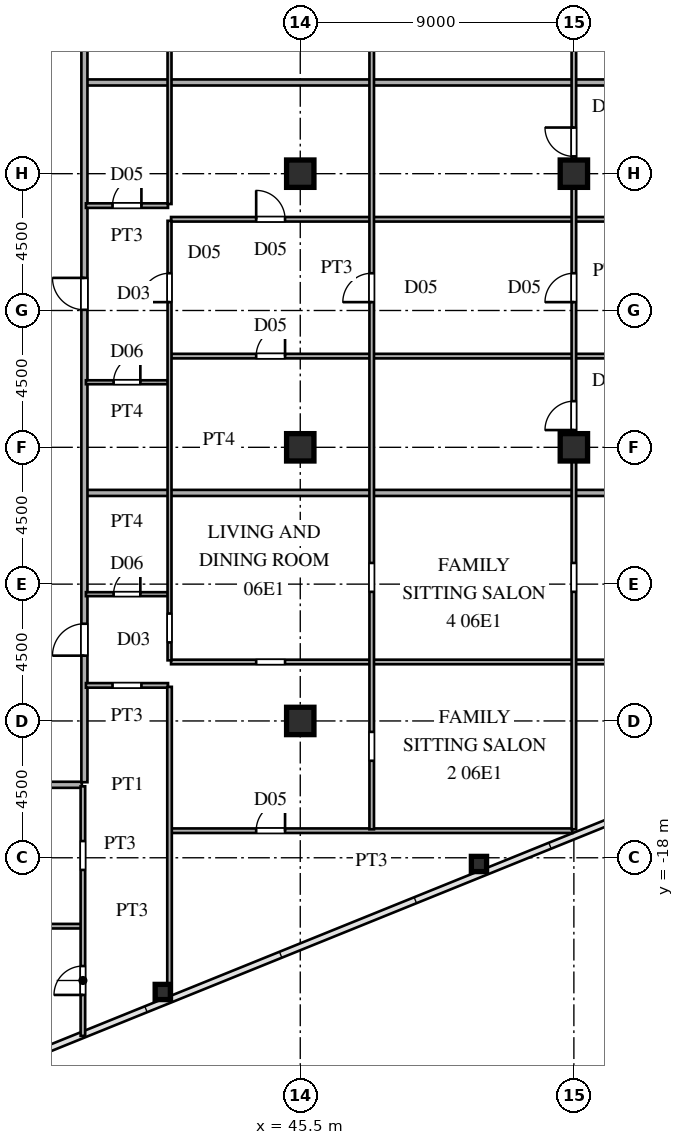
"""IFC4 building model, lengths in metres.
Left out: names, types, materials, properties, quantities, classifications, styles, units other than length and angle.
Written with IfcOpenShell. Run it as: python <this file> out.ifc"""

import sys

from ifc_helpers import new_model, si_unit, direction, frame, frame_2d, origin, origin_2d, place, context, subcontext, project, spatial, rectangle, hollow_rectangle, i_section, extrude, source, transform, mapped, element, fill, save


model = new_model("IFC4")
c1 = context("Model", 3, precision=1e-05, world=origin(), true_north=direction((0.0, 1.0)))
c2 = subcontext(c1, "Body", "Model", "MODEL_VIEW")
j1 = project(units=[si_unit("LENGTHUNIT", "METRE"), si_unit("PLANEANGLEUNIT", "RADIAN")], contexts=[c1])
p1 = place(None, origin())
s1 = spatial("IfcSite", under=j1, at=p1, CompositionType="ELEMENT")
p2 = place(p1, origin())
s2 = spatial("IfcBuilding", under=s1, at=p2, CompositionType="ELEMENT")
p3 = place(p2, frame((0.0, 0.0, 26.1)))
s3 = spatial("IfcBuildingStorey", under=s2, at=p3, CompositionType="ELEMENT", Elevation=26.1)
m1 = source(origin(), c2, "Body", "SweptSolid", [
    extrude(i_section(OverallWidth=0.9, OverallDepth=0.9, WebThickness=0.036, FlangeThickness=0.055, at=origin_2d()), origin(), (0.0, 0.0, 1.0), 3.6),
])
for number, where, z_axis, x_axis in (
    (1, (45.5, -13.5, 0.0), (0.0, 0.0, 1.0), (1.0, 0.0, 0.0)),
    (2, (45.5, -4.5, 0.0), (0.0, 0.0, 1.0), (1.0, 0.0, 0.0)),
    (3, (45.5, 4.5, 0.0), (0.0, 0.0, 1.0), (1.0, 0.0, 0.0)),
    (4, (54.5, -4.5, 0.0), (0.0, 0.0, 1.0), (1.0, 0.0, 0.0)),
    (5, (54.5, 4.5, 0.0), (0.0, 0.0, 1.0), (1.0, 0.0, 0.0)),
):
    element("IfcColumn", number, at=place(p3, frame(where, z_axis=z_axis, x_axis=x_axis)), inside=s3, PredefinedType="COLUMN", context=c2, shape_type="MappedRepresentation", body=[
        mapped(m1, transform((0.0, 0.0, 0.0), scale=1.0)),
    ])
m2 = source(origin(), c2, "Body", "SweptSolid", [
    extrude(hollow_rectangle(XDim=0.5, YDim=0.5, WallThickness=0.02, at=origin_2d()), origin(), (0.0, 0.0, 1.0), 3.6),
])
for number, where, z_axis, x_axis in (
    (6, (40.977, -22.414, 0.0), (0.0, 0.0, 1.0), (1.0, 0.0, 0.0)),
    (7, (51.378, -18.204, 0.0), (0.0, 0.0, 1.0), (1.0, 0.0, 0.0)),
):
    element("IfcColumn", number, at=place(p3, frame(where, z_axis=z_axis, x_axis=x_axis)), inside=s3, PredefinedType="COLUMN", context=c2, shape_type="MappedRepresentation", body=[
        mapped(m2, transform((0.0, 0.0, 0.0), scale=1.0)),
    ])
p4 = place(p3, frame((27.465, -20.25, 0.0), z_axis=(0.0, 0.0, 1.0), x_axis=(1.0, 0.0, 0.0)))
e8 = element("IfcWall", 8, at=p4, inside=s3, PredefinedType="PARTITIONING", context=c2, shape_type="SweptSolid", body=[
    extrude(rectangle(XDim=10.835, YDim=0.15, at=frame_2d((5.417, 0.0))), origin(), (0.0, 0.0, 1.0), 3.38),
])
p5 = place(p3, frame((41.25, -17.11, 0.0), z_axis=(0.0, 0.0, 1.0), x_axis=(1.0, 0.0, 0.0)))
e9 = element("IfcWall", 9, at=p5, inside=s3, PredefinedType="PARTITIONING", context=c2, shape_type="SweptSolid", body=[
    extrude(rectangle(XDim=13.2, YDim=0.15, at=frame_2d((6.6, 0.0))), origin(), (0.0, 0.0, 1.0), 3.38),
])
p6 = place(p5, frame((2.8, 0.0, 0.0)))
e10 = element("IfcOpeningElement", 10, at=p6, cuts=e9, PredefinedType="OPENING", context=c2, shape_type="SweptSolid", body=[
    extrude(rectangle(XDim=0.95, YDim=2.15, at=frame_2d((0.475, 1.075))), frame((0.0, 0.085, 0.0), z_axis=(0.0, -1.0, 0.0), x_axis=(1.0, 0.0, 0.0)), (0.0, 0.0, 1.0), 0.17),
])
p7 = place(p3, frame((36.585, -15.6, 0.0), z_axis=(0.0, 0.0, 1.0), x_axis=(1.0, 0.0, 0.0)))
e11 = element("IfcWall", 11, at=p7, inside=s3, PredefinedType="PARTITIONING", context=c2, shape_type="SweptSolid", body=[
    extrude(rectangle(XDim=1.73, YDim=0.2, at=frame_2d((0.865, 0.0))), origin(), (0.0, 0.0, 1.0), 3.38),
])
p8 = place(p3, frame((38.45, -12.33, 0.0), z_axis=(0.0, 0.0, 1.0), x_axis=(1.0, 0.0, 0.0)))
e12 = element("IfcWall", 12, at=p8, inside=s3, PredefinedType="PARTITIONING", context=c2, shape_type="SweptSolid", body=[
    extrude(rectangle(XDim=2.7, YDim=0.15, at=frame_2d((1.35, 0.0))), origin(), (0.0, 0.0, 1.0), 3.38),
])
p9 = place(p8, frame((0.875, 0.0, 0.0)))
e13 = element("IfcOpeningElement", 13, at=p9, cuts=e12, PredefinedType="OPENING", context=c2, shape_type="SweptSolid", body=[
    extrude(rectangle(XDim=0.95, YDim=2.15, at=frame_2d((0.475, 1.075))), frame((0.0, 0.085, 0.0), z_axis=(0.0, -1.0, 0.0), x_axis=(1.0, 0.0, 0.0)), (0.0, 0.0, 1.0), 0.17),
])
p10 = place(p3, frame((41.25, -11.56, 0.0), z_axis=(0.0, 0.0, 1.0), x_axis=(1.0, 0.0, 0.0)))
e14 = element("IfcWall", 14, at=p10, inside=s3, PredefinedType="PARTITIONING", context=c2, shape_type="SweptSolid", body=[
    extrude(rectangle(XDim=27.44, YDim=0.15, at=frame_2d((13.72, 0.0))), origin(), (0.0, 0.0, 1.0), 3.38),
])
p11 = place(p10, frame((2.8, 0.0, 0.0)))
e15 = element("IfcOpeningElement", 15, at=p11, cuts=e14, PredefinedType="OPENING", context=c2, shape_type="SweptSolid", body=[
    extrude(rectangle(XDim=0.95, YDim=2.15, at=frame_2d((0.475, 1.075))), frame((0.0, 0.085, 0.0), z_axis=(0.0, -1.0, 0.0), x_axis=(1.0, 0.0, 0.0)), (0.0, 0.0, 1.0), 0.17),
])
p12 = place(p10, frame((15.625, 0.0, 0.0)))
e16 = element("IfcOpeningElement", 16, at=p12, cuts=e14, PredefinedType="OPENING", context=c2, shape_type="SweptSolid", body=[
    extrude(rectangle(XDim=0.95, YDim=2.15, at=frame_2d((0.475, 1.075))), frame((0.0, 0.085, 0.0), z_axis=(0.0, -1.0, 0.0), x_axis=(1.0, 0.0, 0.0)), (0.0, 0.0, 1.0), 0.17),
])
p13 = place(p3, frame((38.45, -9.33, 0.0), z_axis=(0.0, 0.0, 1.0), x_axis=(1.0, 0.0, 0.0)))
e17 = element("IfcWall", 17, at=p13, inside=s3, PredefinedType="PARTITIONING", context=c2, shape_type="SweptSolid", body=[
    extrude(rectangle(XDim=2.7, YDim=0.13, at=frame_2d((1.35, 0.0))), origin(), (0.0, 0.0, 1.0), 3.38),
])
p14 = place(p13, frame((0.91, 0.0, 0.0)))
e18 = element("IfcOpeningElement", 18, at=p14, cuts=e17, PredefinedType="OPENING", context=c2, shape_type="SweptSolid", body=[
    extrude(rectangle(XDim=0.88, YDim=2.1, at=frame_2d((0.44, 1.05))), frame((0.0, 0.075, 0.0), z_axis=(0.0, -1.0, 0.0), x_axis=(1.0, 0.0, 0.0)), (0.0, 0.0, 1.0), 0.15),
])
p15 = place(p3, frame((38.48, -6.0, 0.0), z_axis=(0.0, 0.0, 1.0), x_axis=(1.0, 0.0, 0.0)))
e19 = element("IfcWall", 19, at=p15, inside=s3, PredefinedType="PARTITIONING", context=c2, shape_type="SweptSolid", body=[
    extrude(rectangle(XDim=34.025, YDim=0.2, at=frame_2d((17.012, 0.0))), origin(), (0.0, 0.0, 1.0), 3.38),
])
p16 = place(p3, frame((38.45, -2.36, 0.0), z_axis=(0.0, 0.0, 1.0), x_axis=(1.0, 0.0, 0.0)))
e20 = element("IfcWall", 20, at=p16, inside=s3, PredefinedType="PARTITIONING", context=c2, shape_type="SweptSolid", body=[
    extrude(rectangle(XDim=2.7, YDim=0.13, at=frame_2d((1.35, 0.0))), origin(), (0.0, 0.0, 1.0), 3.38),
])
p17 = place(p16, frame((0.91, 0.0, 0.0)))
e21 = element("IfcOpeningElement", 21, at=p17, cuts=e20, PredefinedType="OPENING", context=c2, shape_type="SweptSolid", body=[
    extrude(rectangle(XDim=0.88, YDim=2.1, at=frame_2d((0.44, 1.05))), frame((0.0, 0.075, 0.0), z_axis=(0.0, -1.0, 0.0), x_axis=(1.0, 0.0, 0.0)), (0.0, 0.0, 1.0), 0.15),
])
p18 = place(p3, frame((41.25, -1.5, 0.0), z_axis=(0.0, 0.0, 1.0), x_axis=(1.0, 0.0, 0.0)))
e22 = element("IfcWall", 22, at=p18, inside=s3, PredefinedType="PARTITIONING", context=c2, shape_type="SweptSolid", body=[
    extrude(rectangle(XDim=31.285, YDim=0.15, at=frame_2d((15.643, 0.0))), origin(), (0.0, 0.0, 1.0), 3.38),
])
p19 = place(p18, frame((2.8, 0.0, 0.0)))
e23 = element("IfcOpeningElement", 23, at=p19, cuts=e22, PredefinedType="OPENING", context=c2, shape_type="SweptSolid", body=[
    extrude(rectangle(XDim=0.95, YDim=2.15, at=frame_2d((0.475, 1.075))), frame((0.0, 0.085, 0.0), z_axis=(0.0, -1.0, 0.0), x_axis=(1.0, 0.0, 0.0)), (0.0, 0.0, 1.0), 0.17),
])
p20 = place(p18, frame((15.625, 0.0, 0.0)))
e24 = element("IfcOpeningElement", 24, at=p20, cuts=e22, PredefinedType="OPENING", context=c2, shape_type="SweptSolid", body=[
    extrude(rectangle(XDim=0.95, YDim=2.15, at=frame_2d((0.475, 1.075))), frame((0.0, 0.085, 0.0), z_axis=(0.0, -1.0, 0.0), x_axis=(1.0, 0.0, 0.0)), (0.0, 0.0, 1.0), 0.17),
])
p21 = place(p3, frame((41.25, 3.0, 0.0), z_axis=(0.0, 0.0, 1.0), x_axis=(1.0, 0.0, 0.0)))
e25 = element("IfcWall", 25, at=p21, inside=s3, PredefinedType="PARTITIONING", context=c2, shape_type="SweptSolid", body=[
    extrude(rectangle(XDim=31.285, YDim=0.15, at=frame_2d((15.643, 0.0))), origin(), (0.0, 0.0, 1.0), 3.38),
])
p22 = place(p21, frame((2.8, 0.0, 0.0)))
e26 = element("IfcOpeningElement", 26, at=p22, cuts=e25, PredefinedType="OPENING", context=c2, shape_type="SweptSolid", body=[
    extrude(rectangle(XDim=0.95, YDim=2.15, at=frame_2d((0.475, 1.075))), frame((0.0, 0.085, 0.0), z_axis=(0.0, -1.0, 0.0), x_axis=(1.0, 0.0, 0.0)), (0.0, 0.0, 1.0), 0.17),
])
p23 = place(p21, frame((15.625, 0.0, 0.0)))
e27 = element("IfcOpeningElement", 27, at=p23, cuts=e25, PredefinedType="OPENING", context=c2, shape_type="SweptSolid", body=[
    extrude(rectangle(XDim=0.95, YDim=2.15, at=frame_2d((0.475, 1.075))), frame((0.0, 0.085, 0.0), z_axis=(0.0, -1.0, 0.0), x_axis=(1.0, 0.0, 0.0)), (0.0, 0.0, 1.0), 0.17),
])
p24 = place(p3, frame((38.45, 3.45, 0.0), z_axis=(0.0, 0.0, 1.0), x_axis=(1.0, 0.0, 0.0)))
e28 = element("IfcWall", 28, at=p24, inside=s3, PredefinedType="PARTITIONING", context=c2, shape_type="SweptSolid", body=[
    extrude(rectangle(XDim=2.7, YDim=0.15, at=frame_2d((1.35, 0.0))), origin(), (0.0, 0.0, 1.0), 3.38),
])
p25 = place(p24, frame((0.875, 0.0, 0.0)))
e29 = element("IfcOpeningElement", 29, at=p25, cuts=e28, PredefinedType="OPENING", context=c2, shape_type="SweptSolid", body=[
    extrude(rectangle(XDim=0.95, YDim=2.15, at=frame_2d((0.475, 1.075))), frame((0.0, 0.085, 0.0), z_axis=(0.0, -1.0, 0.0), x_axis=(1.0, 0.0, 0.0)), (0.0, 0.0, 1.0), 0.17),
])
p26 = place(p3, frame((38.48, 7.5, 0.0), z_axis=(0.0, 0.0, 1.0), x_axis=(1.0, 0.0, 0.0)))
e30 = element("IfcWall", 30, at=p26, inside=s3, PredefinedType="PARTITIONING", context=c2, shape_type="SweptSolid", body=[
    extrude(rectangle(XDim=34.025, YDim=0.2, at=frame_2d((17.012, 0.0))), origin(), (0.0, 0.0, 1.0), 3.38),
])
p27 = place(p3, frame((38.35, -23.858, 0.0), z_axis=(0.0, 0.0, 1.0), x_axis=(0.0, 1.0, 0.0)))
e31 = element("IfcWall", 31, at=p27, inside=s3, PredefinedType="PARTITIONING", context=c2, shape_type="SweptSolid", body=[
    extrude(rectangle(XDim=8.208, YDim=0.15, at=frame_2d((4.104, 0.0))), origin(), (0.0, 0.0, 1.0), 3.38),
])
p28 = place(p27, frame((1.347, 0.0, 0.0)))
e32 = element("IfcOpeningElement", 32, at=p28, cuts=e31, PredefinedType="OPENING", context=c2, shape_type="SweptSolid", body=[
    extrude(rectangle(XDim=0.95, YDim=2.15, at=frame_2d((0.475, 1.075))), frame((0.0, 0.085, 0.0), z_axis=(0.0, -1.0, 0.0), x_axis=(1.0, 0.0, 0.0)), (0.0, 0.0, 1.0), 0.17),
])
p29 = place(p27, frame((5.458, 0.0, 0.0)))
e33 = element("IfcOpeningElement", 33, at=p29, cuts=e31, PredefinedType="OPENING", context=c2, shape_type="SweptSolid", body=[
    extrude(rectangle(XDim=0.95, YDim=2.15, at=frame_2d((0.475, 1.075))), frame((0.0, 0.085, 0.0), z_axis=(0.0, -1.0, 0.0), x_axis=(1.0, 0.0, 0.0)), (0.0, 0.0, 1.0), 0.17),
])
p30 = place(p3, frame((38.4, -15.515, 0.0), z_axis=(0.0, 0.0, 1.0), x_axis=(0.0, 1.0, 0.0)))
e34 = element("IfcWall", 34, at=p30, inside=s3, PredefinedType="PARTITIONING", context=c2, shape_type="SweptSolid", body=[
    extrude(rectangle(XDim=31.03, YDim=0.2, at=frame_2d((15.515, 0.0))), origin(), (0.0, 0.0, 1.0), 3.38),
])
p31 = place(p30, frame((4.163, 0.0, 0.0)))
e35 = element("IfcOpeningElement", 35, at=p31, cuts=e34, PredefinedType="OPENING", context=c2, shape_type="SweptSolid", body=[
    extrude(rectangle(XDim=1.05, YDim=2.25, at=frame_2d((0.525, 1.125))), frame((0.0, 0.11, 0.0), z_axis=(0.0, -1.0, 0.0), x_axis=(1.0, 0.0, 0.0)), (0.0, 0.0, 1.0), 0.22),
])
p32 = place(p30, frame((15.538, 0.0, 0.0)))
e36 = element("IfcOpeningElement", 36, at=p32, cuts=e34, PredefinedType="OPENING", context=c2, shape_type="SweptSolid", body=[
    extrude(rectangle(XDim=1.05, YDim=2.25, at=frame_2d((0.525, 1.125))), frame((0.0, 0.11, 0.0), z_axis=(0.0, -1.0, 0.0), x_axis=(1.0, 0.0, 0.0)), (0.0, 0.0, 1.0), 0.22),
])
p33 = place(p30, frame((26.635, 0.0, 0.0)))
e37 = element("IfcOpeningElement", 37, at=p33, cuts=e34, PredefinedType="OPENING", context=c2, shape_type="SweptSolid", body=[
    extrude(rectangle(XDim=1.05, YDim=2.25, at=frame_2d((0.525, 1.125))), frame((0.0, 0.11, 0.0), z_axis=(0.0, -1.0, 0.0), x_axis=(1.0, 0.0, 0.0)), (0.0, 0.0, 1.0), 0.22),
])
p34 = place(p3, frame((41.2, -22.704, 0.0), z_axis=(0.0, 0.0, 1.0), x_axis=(0.0, 1.0, 0.0)))
e38 = element("IfcWall", 38, at=p34, inside=s3, PredefinedType="PARTITIONING", context=c2, shape_type="SweptSolid", body=[
    extrude(rectangle(XDim=10.326, YDim=0.15, at=frame_2d((5.163, 0.0))), origin(), (0.0, 0.0, 1.0), 3.38),
])
p35 = place(p3, frame((41.2, -11.506, 0.0), z_axis=(0.0, 0.0, 1.0), x_axis=(0.0, 1.0, 0.0)))
e39 = element("IfcWall", 39, at=p35, inside=s3, PredefinedType="PARTITIONING", context=c2, shape_type="SweptSolid", body=[
    extrude(rectangle(XDim=14.456, YDim=0.13, at=frame_2d((7.228, 0.0))), origin(), (0.0, 0.0, 1.0), 3.38),
])
p36 = place(p35, frame((0.589, 0.0, 0.0)))
e40 = element("IfcOpeningElement", 40, at=p36, cuts=e39, PredefinedType="OPENING", context=c2, shape_type="SweptSolid", body=[
    extrude(rectangle(XDim=0.95, YDim=2.15, at=frame_2d((0.475, 1.075))), frame((0.0, 0.075, 0.0), z_axis=(0.0, -1.0, 0.0), x_axis=(1.0, 0.0, 0.0)), (0.0, 0.0, 1.0), 0.15),
])
p37 = place(p35, frame((11.781, 0.0, 0.0)))
e41 = element("IfcOpeningElement", 41, at=p37, cuts=e39, PredefinedType="OPENING", context=c2, shape_type="SweptSolid", body=[
    extrude(rectangle(XDim=0.95, YDim=2.15, at=frame_2d((0.475, 1.075))), frame((0.0, 0.075, 0.0), z_axis=(0.0, -1.0, 0.0), x_axis=(1.0, 0.0, 0.0)), (0.0, 0.0, 1.0), 0.15),
])
p38 = place(p3, frame((41.2, 3.502, 0.0), z_axis=(0.0, 0.0, 1.0), x_axis=(0.0, 1.0, 0.0)))
e42 = element("IfcWall", 42, at=p38, inside=s3, PredefinedType="PARTITIONING", context=c2, shape_type="SweptSolid", body=[
    extrude(rectangle(XDim=9.004, YDim=0.13, at=frame_2d((4.502, 0.0))), origin(), (0.0, 0.0, 1.0), 3.38),
])
p39 = place(p38, frame((7.374, 0.0, 0.0)))
e43 = element("IfcOpeningElement", 43, at=p39, cuts=e42, PredefinedType="OPENING", context=c2, shape_type="SweptSolid", body=[
    extrude(rectangle(XDim=0.95, YDim=2.15, at=frame_2d((0.475, 1.075))), frame((0.0, 0.075, 0.0), z_axis=(0.0, -1.0, 0.0), x_axis=(1.0, 0.0, 0.0)), (0.0, 0.0, 1.0), 0.15),
])
p40 = place(p3, frame((47.85, -17.063, 0.0), z_axis=(0.0, 0.0, 1.0), x_axis=(0.0, 1.0, 0.0)))
e44 = element("IfcWall", 44, at=p40, inside=s3, PredefinedType="PARTITIONING", context=c2, shape_type="SweptSolid", body=[
    extrude(rectangle(XDim=34.626, YDim=0.15, at=frame_2d((17.313, 0.0))), origin(), (0.0, 0.0, 1.0), 3.38),
])
p41 = place(p40, frame((7.81, 0.0, 0.0)))
e45 = element("IfcOpeningElement", 45, at=p41, cuts=e44, PredefinedType="OPENING", context=c2, shape_type="SweptSolid", body=[
    extrude(rectangle(XDim=0.95, YDim=2.15, at=frame_2d((0.475, 1.075))), frame((0.0, 0.085, 0.0), z_axis=(0.0, -1.0, 0.0), x_axis=(1.0, 0.0, 0.0)), (0.0, 0.0, 1.0), 0.17),
])
p42 = place(p40, frame((2.253, 0.0, 0.0)))
e46 = element("IfcOpeningElement", 46, at=p42, cuts=e44, PredefinedType="OPENING", context=c2, shape_type="SweptSolid", body=[
    extrude(rectangle(XDim=0.95, YDim=2.15, at=frame_2d((0.475, 1.075))), frame((0.0, 0.085, 0.0), z_axis=(0.0, -1.0, 0.0), x_axis=(1.0, 0.0, 0.0)), (0.0, 0.0, 1.0), 0.17),
])
p43 = place(p40, frame((17.338, 0.0, 0.0)))
e47 = element("IfcOpeningElement", 47, at=p43, cuts=e44, PredefinedType="OPENING", context=c2, shape_type="SweptSolid", body=[
    extrude(rectangle(XDim=0.95, YDim=2.15, at=frame_2d((0.475, 1.075))), frame((0.0, 0.085, 0.0), z_axis=(0.0, -1.0, 0.0), x_axis=(1.0, 0.0, 0.0)), (0.0, 0.0, 1.0), 0.17),
])
p44 = place(p40, frame((26.616, 0.0, 0.0)))
e48 = element("IfcOpeningElement", 48, at=p44, cuts=e44, PredefinedType="OPENING", context=c2, shape_type="SweptSolid", body=[
    extrude(rectangle(XDim=0.95, YDim=2.15, at=frame_2d((0.475, 1.075))), frame((0.0, 0.085, 0.0), z_axis=(0.0, -1.0, 0.0), x_axis=(1.0, 0.0, 0.0)), (0.0, 0.0, 1.0), 0.17),
])
p45 = place(p3, frame((54.5, -17.063, 0.0), z_axis=(0.0, 0.0, 1.0), x_axis=(0.0, 1.0, 0.0)))
e49 = element("IfcWall", 49, at=p45, inside=s3, PredefinedType="PARTITIONING", context=c2, shape_type="SweptSolid", body=[
    extrude(rectangle(XDim=34.384, YDim=0.15, at=frame_2d((17.192, 0.0))), origin(), (0.0, 0.0, 1.0), 2.68),
])
p46 = place(p45, frame((7.81, 0.0, 0.0)))
e50 = element("IfcOpeningElement", 50, at=p46, cuts=e49, PredefinedType="OPENING", context=c2, shape_type="SweptSolid", body=[
    extrude(rectangle(XDim=0.95, YDim=2.15, at=frame_2d((0.475, 1.075))), frame((0.0, 0.085, 0.0), z_axis=(0.0, -1.0, 0.0), x_axis=(1.0, 0.0, 0.0)), (0.0, 0.0, 1.0), 0.17),
])
p47 = place(p45, frame((17.338, 0.0, 0.0)))
e51 = element("IfcOpeningElement", 51, at=p47, cuts=e49, PredefinedType="OPENING", context=c2, shape_type="SweptSolid", body=[
    extrude(rectangle(XDim=0.95, YDim=2.15, at=frame_2d((0.475, 1.075))), frame((0.0, 0.085, 0.0), z_axis=(0.0, -1.0, 0.0), x_axis=(1.0, 0.0, 0.0)), (0.0, 0.0, 1.0), 0.17),
])
p48 = place(p45, frame((13.131, 0.0, 0.0)))
e52 = element("IfcOpeningElement", 52, at=p48, cuts=e49, PredefinedType="OPENING", context=c2, shape_type="SweptSolid", body=[
    extrude(rectangle(XDim=0.95, YDim=2.15, at=frame_2d((0.475, 1.075))), frame((0.0, 0.085, 0.0), z_axis=(0.0, -1.0, 0.0), x_axis=(1.0, 0.0, 0.0)), (0.0, 0.0, 1.0), 0.17),
])
p49 = place(p45, frame((22.131, 0.0, 0.0)))
e53 = element("IfcOpeningElement", 53, at=p49, cuts=e49, PredefinedType="OPENING", context=c2, shape_type="SweptSolid", body=[
    extrude(rectangle(XDim=0.95, YDim=2.15, at=frame_2d((0.475, 1.075))), frame((0.0, 0.085, 0.0), z_axis=(0.0, -1.0, 0.0), x_axis=(1.0, 0.0, 0.0)), (0.0, 0.0, 1.0), 0.17),
])
p50 = place(p45, frame((26.616, 0.0, 0.0)))
e54 = element("IfcOpeningElement", 54, at=p50, cuts=e49, PredefinedType="OPENING", context=c2, shape_type="SweptSolid", body=[
    extrude(rectangle(XDim=0.95, YDim=2.15, at=frame_2d((0.475, 1.075))), frame((0.0, 0.085, 0.0), z_axis=(0.0, -1.0, 0.0), x_axis=(1.0, 0.0, 0.0)), (0.0, 0.0, 1.0), 0.17),
])
m3 = source(origin(), c2, "Body", "SweptSolid", [
    extrude(rectangle(XDim=0.95, YDim=2.15, at=frame_2d((0.475, 1.075))), frame((0.0, 0.025, 0.0), z_axis=(0.0, -1.0, 0.0), x_axis=(1.0, 0.0, 0.0)), (0.0, 0.0, 1.0), 0.05),
])
p51 = place(p6, origin())
e55 = element("IfcDoor", 55, at=p51, inside=s3, OperationType="SINGLE_SWING_RIGHT", PredefinedType="DOOR", context=c2, shape_type="MappedRepresentation", body=[
    mapped(m3, transform((0.0, 0.0, 0.0), scale=1.0)),
])
fill(e10, e55)
m4 = source(origin(), c2, "Body", "SweptSolid", [
    extrude(rectangle(XDim=0.88, YDim=2.1, at=frame_2d((0.44, 1.05))), frame((0.0, 0.025, 0.0), z_axis=(0.0, -1.0, 0.0), x_axis=(1.0, 0.0, 0.0)), (0.0, 0.0, 1.0), 0.05),
])
p52 = place(p14, origin())
e56 = element("IfcDoor", 56, at=p52, inside=s3, OperationType="SINGLE_SWING_RIGHT", PredefinedType="DOOR", context=c2, shape_type="MappedRepresentation", body=[
    mapped(m4, transform((0.0, 0.0, 0.0), scale=1.0)),
])
fill(e18, e56)
p53 = place(p17, origin())
e57 = element("IfcDoor", 57, at=p53, inside=s3, OperationType="SINGLE_SWING_RIGHT", PredefinedType="DOOR", context=c2, shape_type="MappedRepresentation", body=[
    mapped(m4, transform((0.0, 0.0, 0.0), scale=1.0)),
])
fill(e21, e57)
p54 = place(p19, origin())
e58 = element("IfcDoor", 58, at=p54, inside=s3, OperationType="SINGLE_SWING_RIGHT", PredefinedType="DOOR", context=c2, shape_type="MappedRepresentation", body=[
    mapped(m3, transform((0.0, 0.0, 0.0), scale=1.0)),
])
fill(e23, e58)
p55 = place(p22, origin())
e59 = element("IfcDoor", 59, at=p55, inside=s3, OperationType="SINGLE_SWING_LEFT", PredefinedType="DOOR", context=c2, shape_type="MappedRepresentation", body=[
    mapped(m3, transform((0.0, 0.0, 0.0), scale=1.0)),
])
fill(e26, e59)
p56 = place(p25, origin())
e60 = element("IfcDoor", 60, at=p56, inside=s3, OperationType="SINGLE_SWING_RIGHT", PredefinedType="DOOR", context=c2, shape_type="MappedRepresentation", body=[
    mapped(m3, transform((0.0, 0.0, 0.0), scale=1.0)),
])
fill(e29, e60)
p57 = place(p28, origin())
e61 = element("IfcDoor", 61, at=p57, inside=s3, OperationType="SINGLE_SWING_LEFT", PredefinedType="DOOR", context=c2, shape_type="MappedRepresentation", body=[
    mapped(m3, transform((0.0, 0.0, 0.0), scale=1.0)),
])
fill(e32, e61)
m5 = source(origin(), c2, "Body", "SweptSolid", [
    extrude(rectangle(XDim=1.05, YDim=2.25, at=frame_2d((0.525, 1.125))), frame((0.0, 0.025, 0.0), z_axis=(0.0, -1.0, 0.0), x_axis=(1.0, 0.0, 0.0)), (0.0, 0.0, 1.0), 0.05),
])
p58 = place(p31, origin())
e62 = element("IfcDoor", 62, at=p58, inside=s3, OperationType="SINGLE_SWING_LEFT", PredefinedType="DOOR", context=c2, shape_type="MappedRepresentation", body=[
    mapped(m5, transform((0.0, 0.0, 0.0), scale=1.0)),
])
fill(e35, e62)
p59 = place(p32, origin())
e63 = element("IfcDoor", 63, at=p59, inside=s3, OperationType="SINGLE_SWING_RIGHT", PredefinedType="DOOR", context=c2, shape_type="MappedRepresentation", body=[
    mapped(m5, transform((0.0, 0.0, 0.0), scale=1.0)),
])
fill(e36, e63)
p60 = place(p37, origin())
e64 = element("IfcDoor", 64, at=p60, inside=s3, OperationType="SINGLE_SWING_LEFT", PredefinedType="DOOR", context=c2, shape_type="MappedRepresentation", body=[
    mapped(m3, transform((0.0, 0.0, 0.0), scale=1.0)),
])
fill(e41, e64)
p61 = place(p43, origin())
e65 = element("IfcDoor", 65, at=p61, inside=s3, OperationType="SINGLE_SWING_LEFT", PredefinedType="DOOR", context=c2, shape_type="MappedRepresentation", body=[
    mapped(m3, transform((0.0, 0.0, 0.0), scale=1.0)),
])
fill(e47, e65)
p62 = place(p47, origin())
e66 = element("IfcDoor", 66, at=p62, inside=s3, OperationType="SINGLE_SWING_LEFT", PredefinedType="DOOR", context=c2, shape_type="MappedRepresentation", body=[
    mapped(m3, transform((0.0, 0.0, 0.0), scale=1.0)),
])
fill(e51, e66)
p63 = place(p48, origin())
e67 = element("IfcDoor", 67, at=p63, inside=s3, OperationType="SINGLE_SWING_LEFT", PredefinedType="DOOR", context=c2, shape_type="MappedRepresentation", body=[
    mapped(m3, transform((0.0, 0.0, 0.0), scale=1.0)),
])
fill(e52, e67)
p64 = place(p49, origin())
e68 = element("IfcDoor", 68, at=p64, inside=s3, OperationType="SINGLE_SWING_RIGHT", PredefinedType="DOOR", context=c2, shape_type="MappedRepresentation", body=[
    mapped(m3, transform((0.0, 0.0, 0.0), scale=1.0)),
])
fill(e53, e68)
save(model, sys.argv[1])
